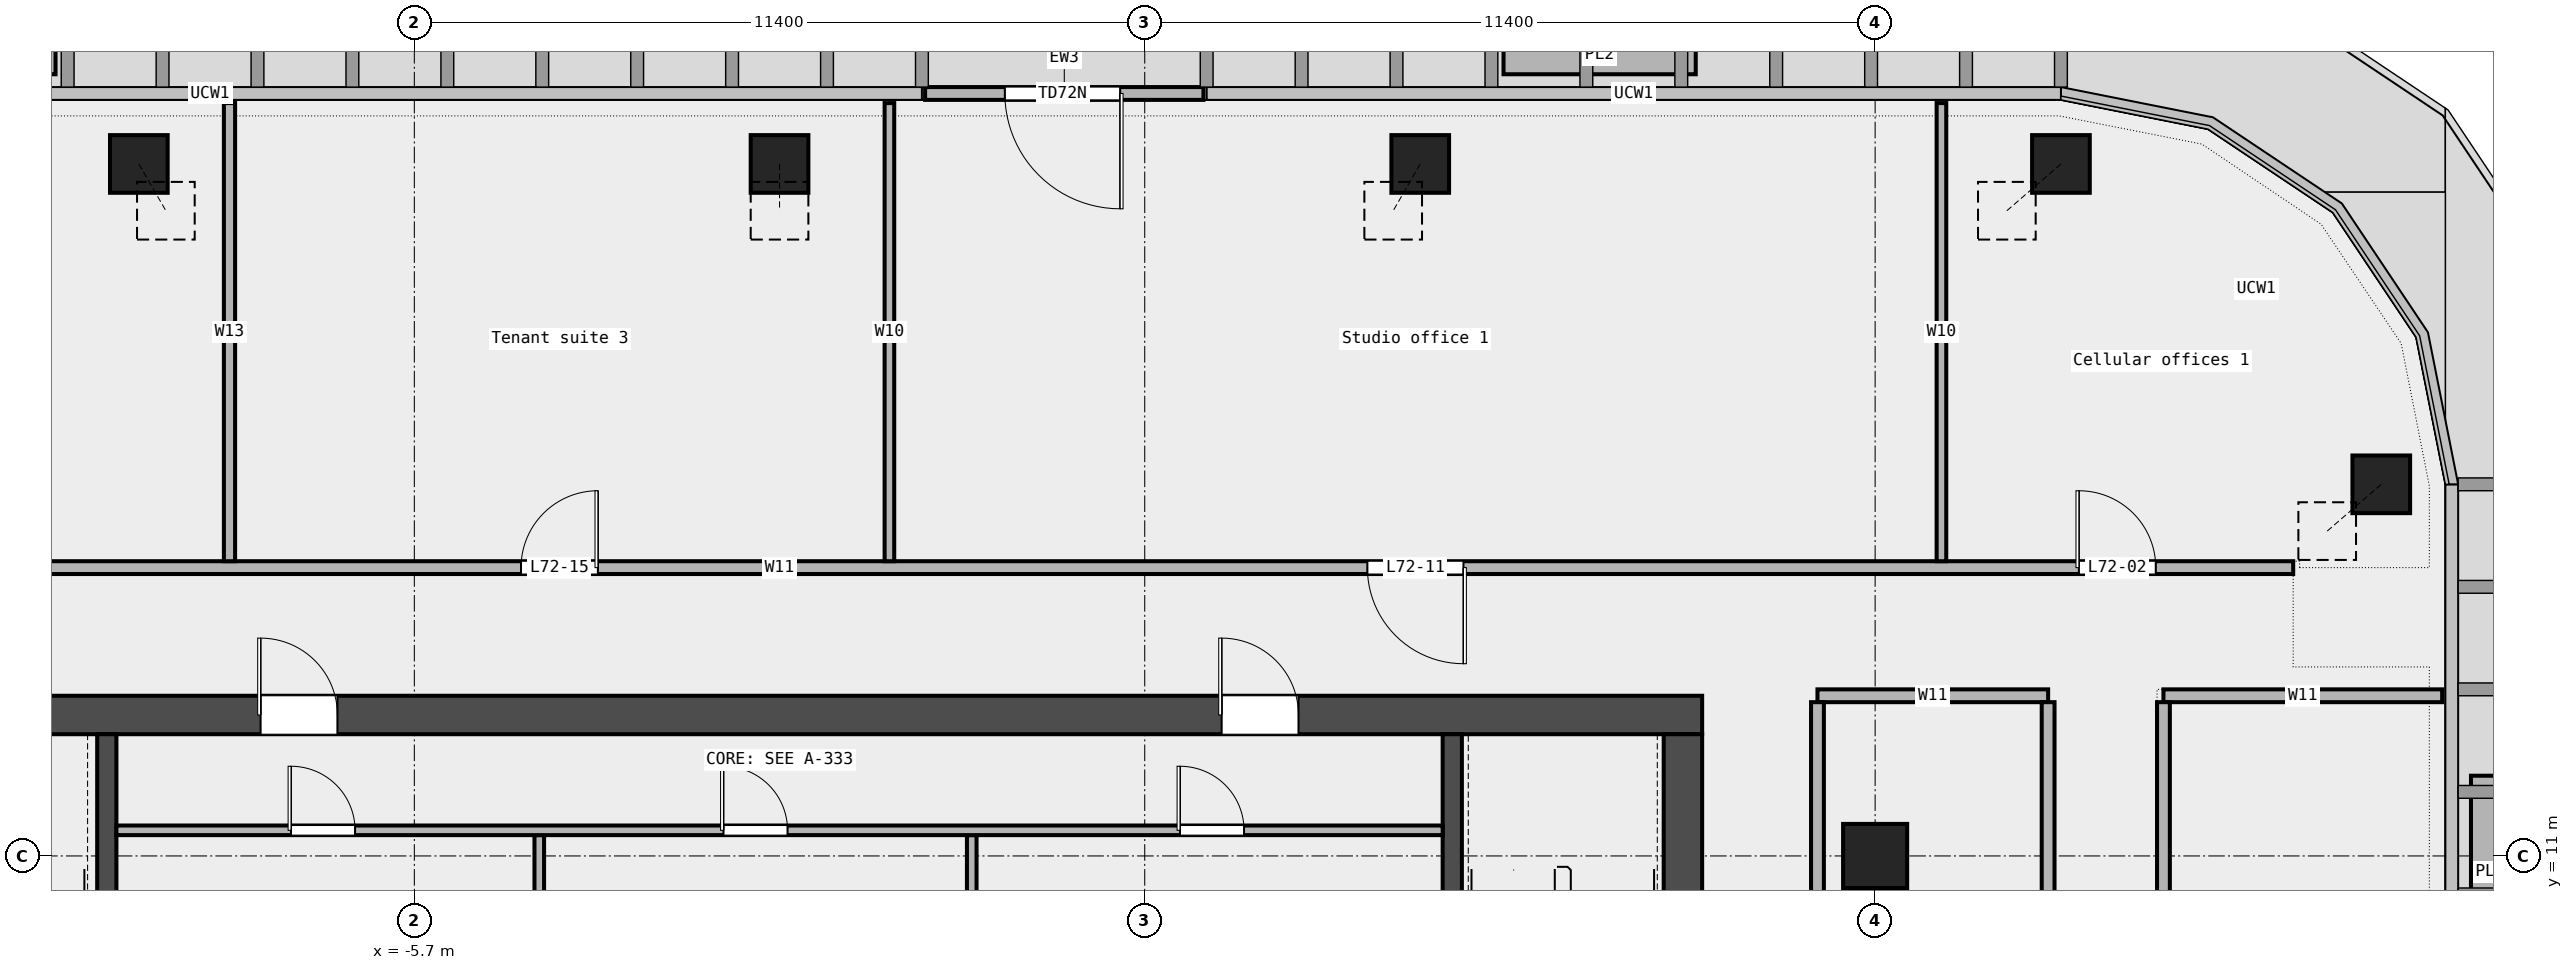
"""IFC4 building model, lengths in metres.
Left out: names, types, materials, properties, quantities, classifications, styles, units other than length and angle.
Written with IfcOpenShell. Run it as: python <this file> out.ifc"""

import sys

from ifc_helpers import new_model, si_unit, direction, frame, frame_2d, origin, origin_2d, place, context, subcontext, project, spatial, rectangle, extrude, element, fill, save


model = new_model("IFC4")
c1 = context("Model", 3, precision=1e-05, world=origin(), true_north=direction((0.0, 1.0)))
c2 = subcontext(c1, "Body", "Model", "MODEL_VIEW")
j1 = project(units=[si_unit("LENGTHUNIT", "METRE"), si_unit("PLANEANGLEUNIT", "RADIAN")], contexts=[c1])
p1 = place(None, origin())
s1 = spatial("IfcSite", under=j1, at=p1, CompositionType="ELEMENT")
p2 = place(p1, origin())
s2 = spatial("IfcBuilding", under=s1, at=p2, CompositionType="ELEMENT")
p3 = place(p2, frame((0.0, 0.0, 329.4)))
s3 = spatial("IfcBuildingStorey", under=s2, at=p3, CompositionType="ELEMENT", Elevation=329.4)
for number, where, z_axis, x_axis in (
    (1, (25.0, 16.8, 0.0), (-0.221, -0.191, 0.956), (0.654, -0.756, 0.0)),
    (2, (20.0, 21.8, 0.0), (-0.221, -0.191, 0.956), (0.654, -0.756, 0.0)),
):
    element("IfcColumn", number, at=place(p3, frame(where, z_axis=z_axis, x_axis=x_axis)), inside=s3, PredefinedType="COLUMN", context=c2, shape_type="SweptSolid", body=[
        extrude(rectangle(XDim=0.9, YDim=0.9, at=origin_2d()), origin(), (0.0, 0.0, 1.0), 3.817),
    ])
p4 = place(p3, frame((10.0, 21.8, 0.0), z_axis=(-0.112612491067, -0.194856104335, 0.974345690943), x_axis=(0.8658093198, -0.500374081811, 0.0)))
e3 = element("IfcColumn", 3, at=p4, inside=s3, PredefinedType="COLUMN", context=c2, shape_type="SweptSolid", body=[
    extrude(rectangle(XDim=0.9, YDim=0.9, at=origin_2d()), origin(), (0.0, 0.0, 1.0), 3.746),
])
p5 = place(p3, frame((0.0, 21.8, 0.0), z_axis=(0.0, -0.196103522341, 0.980583198166), x_axis=(1.0, 0.0, 0.0)))
e4 = element("IfcColumn", 4, at=p5, inside=s3, PredefinedType="COLUMN", context=c2, shape_type="SweptSolid", body=[
    extrude(rectangle(XDim=0.9, YDim=0.9, at=origin_2d()), origin(), (0.0, 0.0, 1.0), 3.722),
])
p6 = place(p3, frame((-10.0, 21.8, 0.0), z_axis=(0.112612491067, -0.194856104335, 0.974345690943), x_axis=(0.8658093198, 0.500374081811, 0.0)))
e5 = element("IfcColumn", 5, at=p6, inside=s3, PredefinedType="COLUMN", context=c2, shape_type="SweptSolid", body=[
    extrude(rectangle(XDim=0.9, YDim=0.9, at=origin_2d()), origin(), (0.0, 0.0, 1.0), 3.746),
])
p7 = place(p3, frame((17.1, 11.0, 0.0), z_axis=(0.0, 0.0, 1.0), x_axis=(1.0, 0.0, 0.0)))
e6 = element("IfcColumn", 6, at=p7, inside=s3, PredefinedType="COLUMN", context=c2, shape_type="SweptSolid", body=[
    extrude(rectangle(XDim=1.0, YDim=1.0, at=origin_2d()), origin(), (0.0, 0.0, 1.0), 3.65),
])
p8 = place(p3, frame((6.617, 22.9, 0.0), z_axis=(0.0, 0.0, 1.0), x_axis=(-1.0, 0.0, 0.0)))
e7 = element("IfcWall", 7, at=p8, inside=s3, PredefinedType="STANDARD", context=c2, shape_type="SweptSolid", body=[
    extrude(rectangle(XDim=4.344, YDim=0.2, at=frame_2d((2.172, 0.0))), origin(), (0.0, 0.0, 1.0), 3.65),
])
p9 = place(p8, frame((1.3, 0.0, 0.0)))
e8 = element("IfcOpeningElement", 8, at=p9, cuts=e7, PredefinedType="OPENING", context=c2, shape_type="SweptSolid", body=[
    extrude(rectangle(XDim=1.8, YDim=2.4, at=frame_2d((0.9, 1.2))), frame((0.0, 0.112, 0.0), z_axis=(0.0, -1.0, 0.0), x_axis=(1.0, 0.0, 0.0)), (0.0, 0.0, 1.0), 0.224),
])
for number, where, z_axis, x_axis in (
    (9, (26.7, 9.252, 0.0), (0.0, 0.0, 1.0), (0.0, 1.0, 0.0)),
    (10, (14.3, 23.5, 0.0), (0.0, 0.0, 1.0), (-1.0, 0.0, 0.0)),
    (11, (-11.3, 23.5, 0.0), (0.0, 0.0, 1.0), (-1.0, 0.0, 0.0)),
):
    element("IfcWall", number, at=place(p3, frame(where, z_axis=z_axis, x_axis=x_axis)), inside=s3, PredefinedType="STANDARD", context=c2, shape_type="SweptSolid", body=[
        extrude(rectangle(XDim=3.0, YDim=0.6, at=frame_2d((1.5, 0.0))), origin(), (0.0, 0.0, 1.0), 0.7),
    ])
p10 = place(p3, frame((16.2, 13.5, 0.0), z_axis=(0.0, 0.0, 1.0), x_axis=(1.0, 0.0, 0.0)))
e12 = element("IfcWall", 12, at=p10, inside=s3, PredefinedType="PARTITIONING", context=c2, shape_type="SweptSolid", body=[
    extrude(rectangle(XDim=3.6, YDim=0.2, at=frame_2d((1.8, 0.0))), origin(), (0.0, 0.0, 1.0), 3.65),
])
p11 = place(p3, frame((21.6, 13.5, 0.0), z_axis=(0.0, 0.0, 1.0), x_axis=(1.0, 0.0, 0.0)))
e13 = element("IfcWall", 13, at=p11, inside=s3, PredefinedType="PARTITIONING", context=c2, shape_type="SweptSolid", body=[
    extrude(rectangle(XDim=4.35, YDim=0.2, at=frame_2d((2.175, 0.0))), origin(), (0.0, 0.0, 1.0), 3.65),
])
p12 = place(p3, frame((-23.625, 15.5, 0.0), z_axis=(0.0, 0.0, 1.0), x_axis=(1.0, 0.0, 0.0)))
e14 = element("IfcWall", 14, at=p12, inside=s3, PredefinedType="PARTITIONING", context=c2, shape_type="SweptSolid", body=[
    extrude(rectangle(XDim=47.25, YDim=0.2, at=frame_2d((23.625, 0.0))), origin(), (0.0, 0.0, 1.0), 3.65),
])
p13 = place(p12, frame((43.905, 0.0, 0.0)))
e15 = element("IfcOpeningElement", 15, at=p13, cuts=e14, PredefinedType="OPENING", context=c2, shape_type="SweptSolid", body=[
    extrude(rectangle(XDim=1.2, YDim=2.1, at=frame_2d((0.6, 1.05))), frame((0.0, 0.112, 0.0), z_axis=(0.0, -1.0, 0.0), x_axis=(1.0, 0.0, 0.0)), (0.0, 0.0, 1.0), 0.224),
])
p14 = place(p12, frame((32.8, 0.0, 0.0)))
e16 = element("IfcOpeningElement", 16, at=p14, cuts=e14, PredefinedType="OPENING", context=c2, shape_type="SweptSolid", body=[
    extrude(rectangle(XDim=1.5, YDim=2.1, at=frame_2d((0.75, 1.05))), frame((0.0, 0.112, 0.0), z_axis=(0.0, -1.0, 0.0), x_axis=(1.0, 0.0, 0.0)), (0.0, 0.0, 1.0), 0.224),
])
p15 = place(p12, frame((19.59, 0.0, 0.0)))
e17 = element("IfcOpeningElement", 17, at=p15, cuts=e14, PredefinedType="OPENING", context=c2, shape_type="SweptSolid", body=[
    extrude(rectangle(XDim=1.2, YDim=2.1, at=frame_2d((0.6, 1.05))), frame((0.0, 0.112, 0.0), z_axis=(0.0, -1.0, 0.0), x_axis=(1.0, 0.0, 0.0)), (0.0, 0.0, 1.0), 0.224),
])
p16 = place(p12, frame((6.77, 0.0, 0.0)))
e18 = element("IfcOpeningElement", 18, at=p16, cuts=e14, PredefinedType="OPENING", context=c2, shape_type="SweptSolid", body=[
    extrude(rectangle(XDim=1.5, YDim=2.1, at=frame_2d((0.75, 1.05))), frame((0.0, 0.112, 0.0), z_axis=(0.0, -1.0, 0.0), x_axis=(1.0, 0.0, 0.0)), (0.0, 0.0, 1.0), 0.224),
])
p17 = place(p3, frame((-8.585, 15.6, 0.0), z_axis=(0.0, 0.0, 1.0), x_axis=(0.0, 1.0, 0.0)))
e19 = element("IfcWall", 19, at=p17, inside=s3, PredefinedType="PARTITIONING", context=c2, shape_type="SweptSolid", body=[
    extrude(rectangle(XDim=7.15, YDim=0.175, at=frame_2d((3.575, 0.0))), origin(), (0.0, 0.0, 1.0), 3.65),
])
p18 = place(p3, frame((1.715, 15.6, 0.0), z_axis=(0.0, 0.0, 1.0), x_axis=(0.0, 1.0, 0.0)))
e20 = element("IfcWall", 20, at=p18, inside=s3, PredefinedType="PARTITIONING", context=c2, shape_type="SweptSolid", body=[
    extrude(rectangle(XDim=7.15, YDim=0.15, at=frame_2d((3.575, 0.0))), origin(), (0.0, 0.0, 1.0), 3.65),
])
p19 = place(p3, frame((16.2, -0.74, 0.0), z_axis=(0.0, 0.0, 1.0), x_axis=(0.0, 1.0, 0.0)))
e21 = element("IfcWall", 21, at=p19, inside=s3, PredefinedType="PARTITIONING", context=c2, shape_type="SweptSolid", body=[
    extrude(rectangle(XDim=14.14, YDim=0.2, at=frame_2d((7.07, 0.0))), origin(), (0.0, 0.0, 1.0), 3.65),
])
p20 = place(p19, frame((9.758, 0.0, 0.0)))
e22 = element("IfcOpeningElement", 22, at=p20, cuts=e21, PredefinedType="OPENING", context=c2, shape_type="SweptSolid", body=[
    extrude(rectangle(XDim=0.9, YDim=2.1, at=frame_2d((0.45, 1.05))), frame((0.0, 0.112, 0.0), z_axis=(0.0, -1.0, 0.0), x_axis=(1.0, 0.0, 0.0)), (0.0, 0.0, 1.0), 0.224),
])
p21 = place(p19, frame((2.637, 0.0, 0.0)))
e23 = element("IfcOpeningElement", 23, at=p21, cuts=e21, PredefinedType="OPENING", context=c2, shape_type="SweptSolid", body=[
    extrude(rectangle(XDim=1.0, YDim=2.1, at=frame_2d((0.5, 1.05))), frame((0.0, 0.112, 0.0), z_axis=(0.0, -1.0, 0.0), x_axis=(1.0, 0.0, 0.0)), (0.0, 0.0, 1.0), 0.224),
])
p22 = place(p3, frame((18.135, 15.6, 0.0), z_axis=(0.0, 0.0, 1.0), x_axis=(0.0, 1.0, 0.0)))
e24 = element("IfcWall", 24, at=p22, inside=s3, PredefinedType="PARTITIONING", context=c2, shape_type="SweptSolid", body=[
    extrude(rectangle(XDim=7.15, YDim=0.15, at=frame_2d((3.575, 0.0))), origin(), (0.0, 0.0, 1.0), 3.65),
])
p23 = place(p3, frame((19.8, -0.74, 0.0), z_axis=(0.0, 0.0, 1.0), x_axis=(0.0, 1.0, 0.0)))
e25 = element("IfcWall", 25, at=p23, inside=s3, PredefinedType="PARTITIONING", context=c2, shape_type="SweptSolid", body=[
    extrude(rectangle(XDim=14.14, YDim=0.2, at=frame_2d((7.07, 0.0))), origin(), (0.0, 0.0, 1.0), 3.65),
])
p24 = place(p3, frame((21.6, -7.1, 0.0), z_axis=(0.0, 0.0, 1.0), x_axis=(0.0, 1.0, 0.0)))
e26 = element("IfcWall", 26, at=p24, inside=s3, PredefinedType="PARTITIONING", context=c2, shape_type="SweptSolid", body=[
    extrude(rectangle(XDim=20.5, YDim=0.2, at=frame_2d((10.25, 0.0))), origin(), (0.0, 0.0, 1.0), 3.65),
])
p25 = place(p24, frame((2.95, 0.0, 0.0)))
e27 = element("IfcOpeningElement", 27, at=p25, cuts=e26, PredefinedType="OPENING", context=c2, shape_type="SweptSolid", body=[
    extrude(rectangle(XDim=0.9, YDim=2.1, at=frame_2d((0.45, 1.05))), frame((0.0, 0.112, 0.0), z_axis=(0.0, -1.0, 0.0), x_axis=(1.0, 0.0, 0.0)), (0.0, 0.0, 1.0), 0.224),
])
p26 = place(p24, frame((13.05, 0.0, 0.0)))
e28 = element("IfcOpeningElement", 28, at=p26, cuts=e26, PredefinedType="OPENING", context=c2, shape_type="SweptSolid", body=[
    extrude(rectangle(XDim=1.2, YDim=2.1, at=frame_2d((0.6, 1.05))), frame((0.0, 0.112, 0.0), z_axis=(0.0, -1.0, 0.0), x_axis=(1.0, 0.0, 0.0)), (0.0, 0.0, 1.0), 0.224),
])
p27 = place(p3, frame((-14.4, 13.2, 0.0), z_axis=(0.0, 0.0, 1.0), x_axis=(1.0, 0.0, 0.0)))
e29 = element("IfcWall", 29, at=p27, inside=s3, PredefinedType="SHEAR", context=c2, shape_type="SweptSolid", body=[
    extrude(rectangle(XDim=28.8, YDim=0.6, at=frame_2d((14.4, 0.0))), origin(), (0.0, 0.0, 1.0), 3.7),
])
p28 = place(p27, frame((6.3, 0.0, 0.0)))
e30 = element("IfcOpeningElement", 30, at=p28, cuts=e29, PredefinedType="OPENING", context=c2, shape_type="SweptSolid", body=[
    extrude(rectangle(XDim=1.2, YDim=2.1, at=frame_2d((0.6, 1.05))), frame((0.0, 0.312, 0.0), z_axis=(0.0, -1.0, 0.0), x_axis=(1.0, 0.0, 0.0)), (0.0, 0.0, 1.0), 0.624),
])
p29 = place(p27, frame((21.3, 0.0, 0.0)))
e31 = element("IfcOpeningElement", 31, at=p29, cuts=e29, PredefinedType="OPENING", context=c2, shape_type="SweptSolid", body=[
    extrude(rectangle(XDim=1.2, YDim=2.1, at=frame_2d((0.6, 1.05))), frame((0.0, 0.312, 0.0), z_axis=(0.0, -1.0, 0.0), x_axis=(1.0, 0.0, 0.0)), (0.0, 0.0, 1.0), 0.624),
])
p30 = place(p3, frame((14.1, -6.6, 0.0), z_axis=(0.0, 0.0, 1.0), x_axis=(0.0, 1.0, 0.0)))
e32 = element("IfcWall", 32, at=p30, inside=s3, PredefinedType="SHEAR", context=c2, shape_type="SweptSolid", body=[
    extrude(rectangle(XDim=19.5, YDim=0.6, at=frame_2d((9.75, 0.0))), origin(), (0.0, 0.0, 1.0), 3.7),
])
p31 = place(p30, frame((9.3, 0.0, 0.0)))
e33 = element("IfcOpeningElement", 33, at=p31, cuts=e32, PredefinedType="OPENING", context=c2, shape_type="SweptSolid", body=[
    extrude(rectangle(XDim=1.8, YDim=2.1, at=frame_2d((0.9, 1.05))), frame((0.0, 0.312, 0.0), z_axis=(0.0, -1.0, 0.0), x_axis=(1.0, 0.0, 0.0)), (0.0, 0.0, 1.0), 0.624),
])
for number, where, z_axis, x_axis in (
    (34, (-10.5, 5.25, 0.0), (0.0, 0.0, 1.0), (0.0, 1.0, 0.0)),
    (35, (10.5, 5.25, 0.0), (0.0, 0.0, 1.0), (0.0, 1.0, 0.0)),
):
    element("IfcWall", number, at=place(p3, frame(where, z_axis=z_axis, x_axis=x_axis)), inside=s3, PredefinedType="SHEAR", context=c2, shape_type="SweptSolid", body=[
        extrude(rectangle(XDim=7.65, YDim=0.3, at=frame_2d((3.825, 0.0))), origin(), (0.0, 0.0, 1.0), 3.7),
    ])
for number, where, z_axis, x_axis in (
    (36, (-3.75, 8.55, 0.0), (0.0, 0.0, 1.0), (0.0, 1.0, 0.0)),
    (37, (3.0, 8.55, 0.0), (0.0, 0.0, 1.0), (0.0, 1.0, 0.0)),
):
    element("IfcWall", number, at=place(p3, frame(where, z_axis=z_axis, x_axis=x_axis)), inside=s3, PredefinedType="PARTITIONING", context=c2, shape_type="SweptSolid", body=[
        extrude(rectangle(XDim=2.775, YDim=0.15, at=frame_2d((1.387, 0.0))), origin(), (0.0, 0.0, 1.0), 3.7),
    ])
p32 = place(p3, frame((-10.35, 11.4, 0.0), z_axis=(0.0, 0.0, 1.0), x_axis=(1.0, 0.0, 0.0)))
e38 = element("IfcWall", 38, at=p32, inside=s3, PredefinedType="PARTITIONING", context=c2, shape_type="SweptSolid", body=[
    extrude(rectangle(XDim=20.7, YDim=0.15, at=frame_2d((10.35, 0.0))), origin(), (0.0, 0.0, 1.0), 3.7),
])
p33 = place(p32, frame((2.725, 0.0, 0.0)))
e39 = element("IfcOpeningElement", 39, at=p33, cuts=e38, PredefinedType="OPENING", context=c2, shape_type="SweptSolid", body=[
    extrude(rectangle(XDim=1.0, YDim=2.1, at=frame_2d((0.5, 1.05))), frame((0.0, 0.087, 0.0), z_axis=(0.0, -1.0, 0.0), x_axis=(1.0, 0.0, 0.0)), (0.0, 0.0, 1.0), 0.174),
])
p34 = place(p32, frame((9.475, 0.0, 0.0)))
e40 = element("IfcOpeningElement", 40, at=p34, cuts=e38, PredefinedType="OPENING", context=c2, shape_type="SweptSolid", body=[
    extrude(rectangle(XDim=1.0, YDim=2.1, at=frame_2d((0.5, 1.05))), frame((0.0, 0.087, 0.0), z_axis=(0.0, -1.0, 0.0), x_axis=(1.0, 0.0, 0.0)), (0.0, 0.0, 1.0), 0.174),
])
p35 = place(p32, frame((16.6, 0.0, 0.0)))
e41 = element("IfcOpeningElement", 41, at=p35, cuts=e38, PredefinedType="OPENING", context=c2, shape_type="SweptSolid", body=[
    extrude(rectangle(XDim=1.0, YDim=2.1, at=frame_2d((0.5, 1.05))), frame((0.0, 0.087, 0.0), z_axis=(0.0, -1.0, 0.0), x_axis=(1.0, 0.0, 0.0)), (0.0, 0.0, 1.0), 0.174),
])
p36 = place(p9, origin())
e42 = element("IfcDoor", 42, at=p36, inside=s3, OperationType="DOUBLE_DOOR_SINGLE_SWING", PredefinedType="DOOR", context=c2, shape_type="SweptSolid", body=[
    extrude(rectangle(XDim=1.8, YDim=2.4, at=frame_2d((0.9, 1.2))), frame((0.0, 0.025, 0.0), z_axis=(0.0, -1.0, 0.0), x_axis=(1.0, 0.0, 0.0)), (0.0, 0.0, 1.0), 0.05),
])
fill(e8, e42)
p37 = place(p13, origin())
e43 = element("IfcDoor", 43, at=p37, inside=s3, OperationType="SINGLE_SWING_LEFT", PredefinedType="DOOR", context=c2, shape_type="SweptSolid", body=[
    extrude(rectangle(XDim=1.2, YDim=2.1, at=frame_2d((0.6, 1.05))), frame((0.0, 0.025, 0.0), z_axis=(0.0, -1.0, 0.0), x_axis=(1.0, 0.0, 0.0)), (0.0, 0.0, 1.0), 0.05),
])
fill(e15, e43)
p38 = place(p14, origin())
e44 = element("IfcDoor", 44, at=p38, inside=s3, OperationType="DOUBLE_DOOR_SINGLE_SWING", PredefinedType="DOOR", context=c2, shape_type="SweptSolid", body=[
    extrude(rectangle(XDim=1.5, YDim=2.1, at=frame_2d((0.75, 1.05))), frame((0.0, 0.025, 0.0), z_axis=(0.0, -1.0, 0.0), x_axis=(1.0, 0.0, 0.0)), (0.0, 0.0, 1.0), 0.05),
])
fill(e16, e44)
p39 = place(p15, origin())
e45 = element("IfcDoor", 45, at=p39, inside=s3, OperationType="SINGLE_SWING_RIGHT", PredefinedType="DOOR", context=c2, shape_type="SweptSolid", body=[
    extrude(rectangle(XDim=1.2, YDim=2.1, at=frame_2d((0.6, 1.05))), frame((0.0, 0.025, 0.0), z_axis=(0.0, -1.0, 0.0), x_axis=(1.0, 0.0, 0.0)), (0.0, 0.0, 1.0), 0.05),
])
fill(e17, e45)
p40 = place(p33, origin())
e46 = element("IfcDoor", 46, at=p40, inside=s3, OperationType="SINGLE_SWING_LEFT", PredefinedType="DOOR", context=c2, shape_type="SweptSolid", body=[
    extrude(rectangle(XDim=1.0, YDim=2.1, at=frame_2d((0.5, 1.05))), frame((0.0, 0.025, 0.0), z_axis=(0.0, -1.0, 0.0), x_axis=(1.0, 0.0, 0.0)), (0.0, 0.0, 1.0), 0.05),
])
fill(e39, e46)
p41 = place(p34, origin())
e47 = element("IfcDoor", 47, at=p41, inside=s3, OperationType="SINGLE_SWING_LEFT", PredefinedType="DOOR", context=c2, shape_type="SweptSolid", body=[
    extrude(rectangle(XDim=1.0, YDim=2.1, at=frame_2d((0.5, 1.05))), frame((0.0, 0.025, 0.0), z_axis=(0.0, -1.0, 0.0), x_axis=(1.0, 0.0, 0.0)), (0.0, 0.0, 1.0), 0.05),
])
fill(e40, e47)
p42 = place(p35, origin())
e48 = element("IfcDoor", 48, at=p42, inside=s3, OperationType="SINGLE_SWING_LEFT", PredefinedType="DOOR", context=c2, shape_type="SweptSolid", body=[
    extrude(rectangle(XDim=1.0, YDim=2.1, at=frame_2d((0.5, 1.05))), frame((0.0, 0.025, 0.0), z_axis=(0.0, -1.0, 0.0), x_axis=(1.0, 0.0, 0.0)), (0.0, 0.0, 1.0), 0.05),
])
fill(e41, e48)
p43 = place(p28, origin())
e49 = element("IfcDoor", 49, at=p43, inside=s3, OperationType="SINGLE_SWING_LEFT", PredefinedType="DOOR", context=c2, shape_type="SweptSolid", body=[
    extrude(rectangle(XDim=1.2, YDim=2.1, at=frame_2d((0.6, 1.05))), frame((0.0, 0.025, 0.0), z_axis=(0.0, -1.0, 0.0), x_axis=(1.0, 0.0, 0.0)), (0.0, 0.0, 1.0), 0.05),
])
fill(e30, e49)
p44 = place(p29, origin())
e50 = element("IfcDoor", 50, at=p44, inside=s3, OperationType="SINGLE_SWING_RIGHT", PredefinedType="DOOR", context=c2, shape_type="SweptSolid", body=[
    extrude(rectangle(XDim=1.2, YDim=2.1, at=frame_2d((0.6, 1.05))), frame((0.0, 0.025, 0.0), z_axis=(0.0, -1.0, 0.0), x_axis=(1.0, 0.0, 0.0)), (0.0, 0.0, 1.0), 0.05),
])
fill(e31, e50)
save(model, sys.argv[1])
